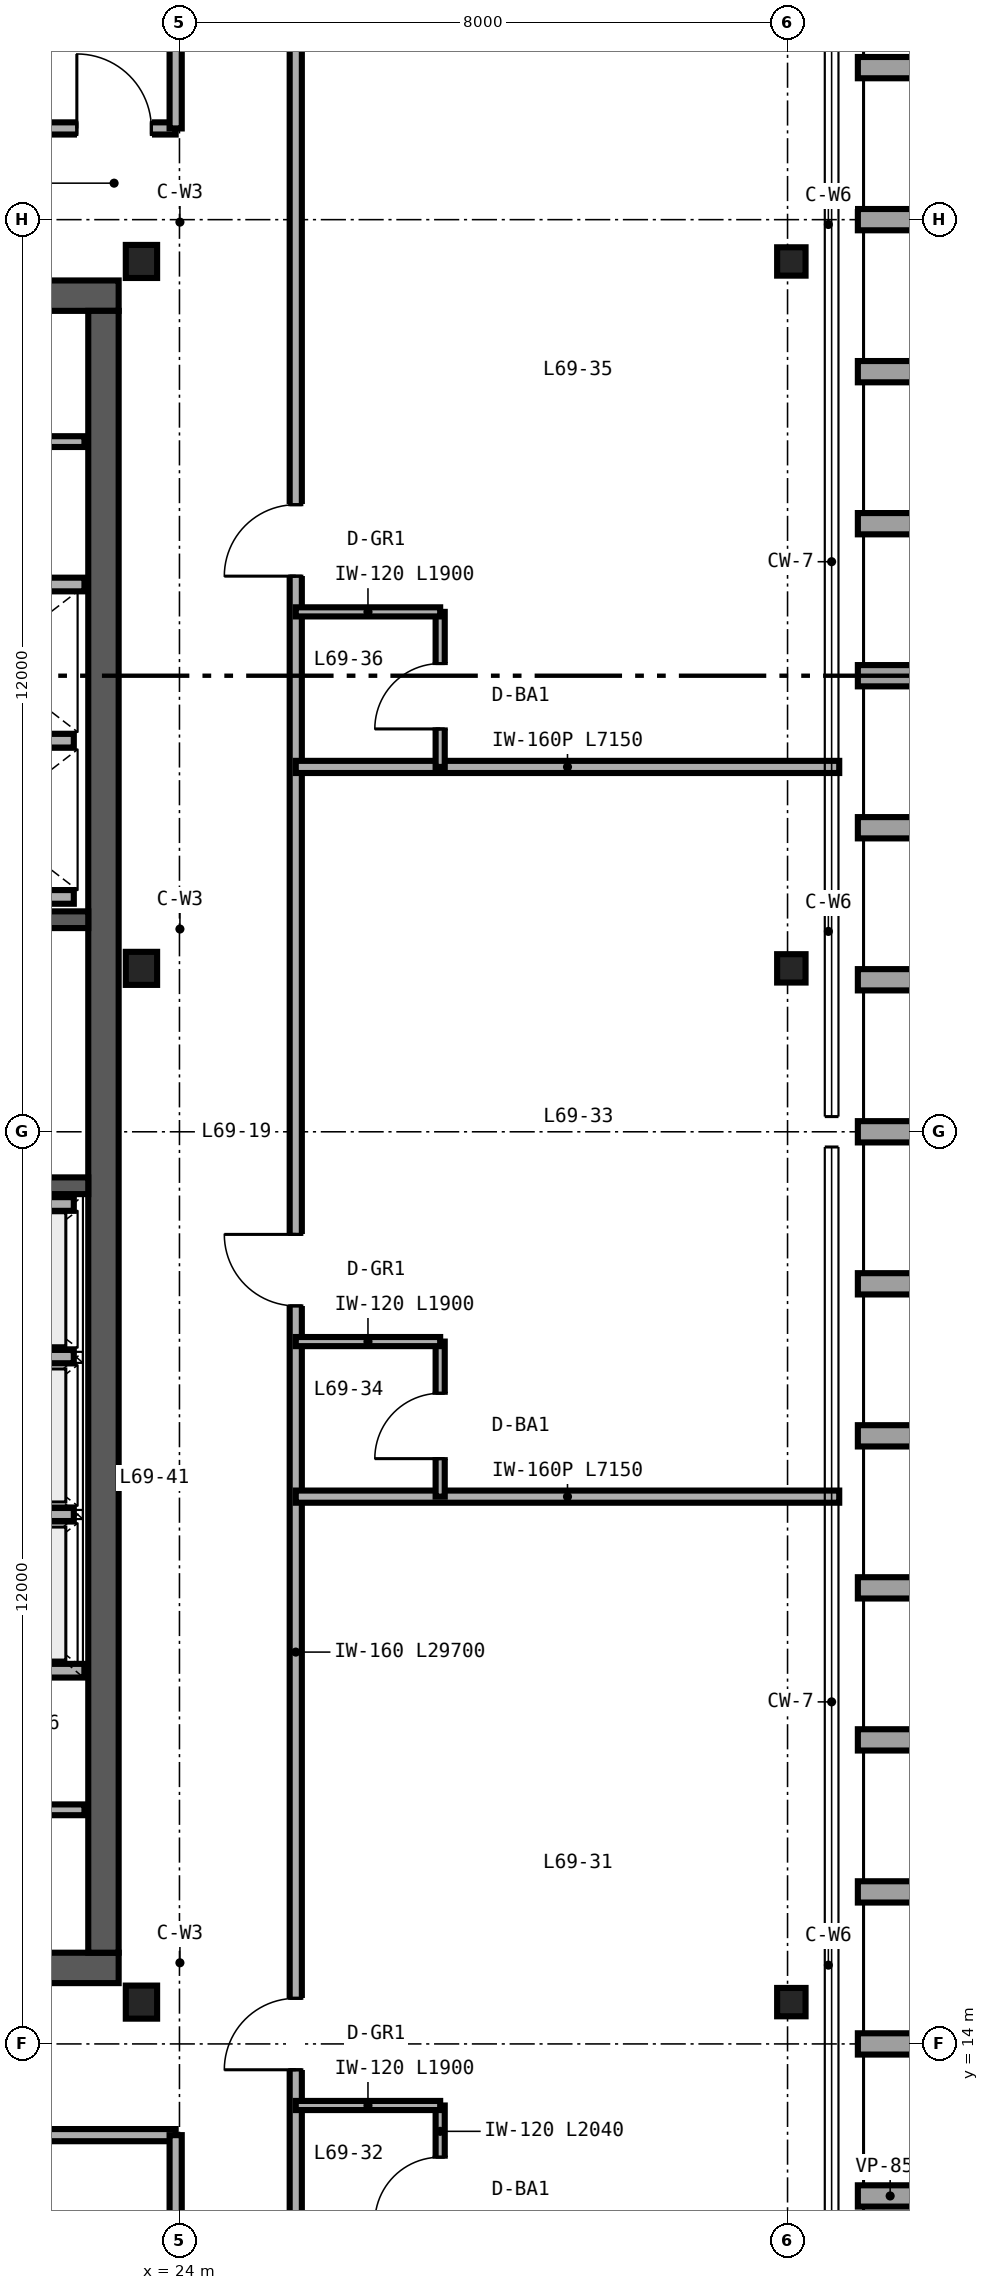
"""IFC4 building model, lengths in metres.
Left out: names, types, materials, properties, quantities, classifications, styles, units other than length and angle.
Written with IfcOpenShell. Run it as: python <this file> out.ifc"""

import sys

from ifc_helpers import new_model, si_unit, direction, frame, frame_2d, origin, origin_2d, place, context, subcontext, project, spatial, rectangle, i_section, extrude, source, transform, mapped, element, fill, save


model = new_model("IFC4")
c1 = context("Model", 3, precision=1e-05, world=origin(), true_north=direction((0.0, 1.0)))
c2 = subcontext(c1, "Body", "Model", "MODEL_VIEW")
j1 = project(units=[si_unit("LENGTHUNIT", "METRE"), si_unit("PLANEANGLEUNIT", "RADIAN")], contexts=[c1])
p1 = place(None, origin())
s1 = spatial("IfcSite", under=j1, at=p1, CompositionType="ELEMENT")
p2 = place(p1, origin())
s2 = spatial("IfcBuilding", under=s1, at=p2, CompositionType="ELEMENT")
p3 = place(p2, frame((0.0, 0.0, 272.4)))
s3 = spatial("IfcBuildingStorey", under=s2, at=p3, CompositionType="ELEMENT", Elevation=272.4)
p4 = place(p3, frame((10.8, 15.0, 0.0), z_axis=(0.0, 0.0, 1.0), x_axis=(1.0, 0.0, 0.0)))
e1 = element("IfcWall", 1, at=p4, inside=s3, PredefinedType="SHEAR", context=c2, shape_type="SweptSolid", body=[
    extrude(rectangle(XDim=12.4, YDim=0.4, at=frame_2d((6.2, 0.0))), origin(), (0.0, 0.0, 1.0), 3.38),
])
p5 = place(p4, frame((10.1, 0.0, 0.0)))
e2 = element("IfcOpeningElement", 2, at=p5, cuts=e1, PredefinedType="OPENING", context=c2, shape_type="SweptSolid", body=[
    extrude(rectangle(XDim=1.0, YDim=2.15, at=frame_2d((0.5, 1.075))), frame((0.0, 0.21, 0.0), z_axis=(0.0, -1.0, 0.0), x_axis=(1.0, 0.0, 0.0)), (0.0, 0.0, 1.0), 0.42),
])
p6 = place(p3, frame((10.8, 37.0, 0.0), z_axis=(0.0, 0.0, 1.0), x_axis=(1.0, 0.0, 0.0)))
e3 = element("IfcWall", 3, at=p6, inside=s3, PredefinedType="SHEAR", context=c2, shape_type="SweptSolid", body=[
    extrude(rectangle(XDim=12.4, YDim=0.4, at=frame_2d((6.2, 0.0))), origin(), (0.0, 0.0, 1.0), 3.38),
])
p7 = place(p6, frame((10.3, 0.0, 0.0)))
e4 = element("IfcOpeningElement", 4, at=p7, cuts=e3, PredefinedType="OPENING", context=c2, shape_type="SweptSolid", body=[
    extrude(rectangle(XDim=1.0, YDim=2.15, at=frame_2d((0.5, 1.075))), frame((0.0, 0.21, 0.0), z_axis=(0.0, -1.0, 0.0), x_axis=(1.0, 0.0, 0.0)), (0.0, 0.0, 1.0), 0.42),
])
p8 = place(p3, frame((23.0, 15.2, 0.0), z_axis=(0.0, 0.0, 1.0), x_axis=(0.0, 1.0, 0.0)))
e5 = element("IfcWall", 5, at=p8, inside=s3, PredefinedType="SHEAR", context=c2, shape_type="SweptSolid", body=[
    extrude(rectangle(XDim=21.6, YDim=0.4, at=frame_2d((10.8, 0.0))), origin(), (0.0, 0.0, 1.0), 3.38),
])
p9 = place(p3, frame((14.18, 25.29, 0.0), z_axis=(0.0, 0.0, 1.0), x_axis=(1.0, 0.0, 0.0)))
e6 = element("IfcWall", 6, at=p9, inside=s3, PredefinedType="SHEAR", context=c2, shape_type="SweptSolid", body=[
    extrude(rectangle(XDim=8.62, YDim=0.22, at=frame_2d((4.31, 0.0))), origin(), (0.0, 0.0, 1.0), 3.4),
])
p10 = place(p9, frame((0.47, 0.0, 0.0)))
e7 = element("IfcOpeningElement", 7, at=p10, cuts=e6, PredefinedType="OPENING", context=c2, shape_type="SweptSolid", body=[
    extrude(rectangle(XDim=1.05, YDim=2.15, at=frame_2d((0.525, 1.075))), frame((0.0, 0.12, 0.0), z_axis=(0.0, -1.0, 0.0), x_axis=(1.0, 0.0, 0.0)), (0.0, 0.0, 1.0), 0.24),
])
p11 = place(p3, frame((14.18, 28.79, 0.0), z_axis=(0.0, 0.0, 1.0), x_axis=(1.0, 0.0, 0.0)))
e8 = element("IfcWall", 8, at=p11, inside=s3, PredefinedType="SHEAR", context=c2, shape_type="SweptSolid", body=[
    extrude(rectangle(XDim=8.62, YDim=0.22, at=frame_2d((4.31, 0.0))), origin(), (0.0, 0.0, 1.0), 3.4),
])
m1 = source(origin(), c2, "Body", "SweptSolid", [
    extrude(i_section(OverallWidth=0.412, OverallDepth=0.435, WebThickness=0.036, FlangeThickness=0.057, FilletRadius=0.025, at=origin_2d()), origin(), (0.0, 0.0, 1.0), 3.38),
])
for number, where, z_axis, x_axis in (
    (9, (23.5, 14.55, 0.0), (0.0, 0.0, 1.0), (1.0, 0.0, 0.0)),
    (10, (23.5, 28.15, 0.0), (0.0, 0.0, 1.0), (1.0, 0.0, 0.0)),
    (11, (23.5, 37.45, 0.0), (0.0, 0.0, 1.0), (1.0, 0.0, 0.0)),
):
    element("IfcColumn", number, at=place(p3, frame(where, z_axis=z_axis, x_axis=x_axis)), inside=s3, PredefinedType="COLUMN", context=c2, shape_type="MappedRepresentation", body=[
        mapped(m1, transform((0.0, 0.0, 0.0), scale=1.0)),
    ])
m2 = source(origin(), c2, "Body", "SweptSolid", [
    extrude(i_section(OverallWidth=0.374, OverallDepth=0.373, WebThickness=0.016, FlangeThickness=0.026, FilletRadius=0.025, at=origin_2d()), origin(), (0.0, 0.0, 1.0), 3.38),
])
for number, where, z_axis, x_axis in (
    (12, (32.05, 14.55, 0.0), (0.0, 0.0, 1.0), (1.0, 0.0, 0.0)),
    (13, (32.05, 28.15, 0.0), (0.0, 0.0, 1.0), (1.0, 0.0, 0.0)),
    (14, (32.05, 37.45, 0.0), (0.0, 0.0, 1.0), (1.0, 0.0, 0.0)),
):
    element("IfcColumn", number, at=place(p3, frame(where, z_axis=z_axis, x_axis=x_axis)), inside=s3, PredefinedType="COLUMN", context=c2, shape_type="MappedRepresentation", body=[
        mapped(m2, transform((0.0, 0.0, 0.0), scale=1.0)),
    ])
p12 = place(p3, frame((20.12, 18.91, 0.0), z_axis=(0.0, 0.0, 1.0), x_axis=(1.0, 0.0, 0.0)))
e15 = element("IfcWall", 15, at=p12, inside=s3, PredefinedType="SOLIDWALL", context=c2, shape_type="SweptSolid", body=[
    extrude(rectangle(XDim=2.63, YDim=0.18, at=frame_2d((1.315, 0.0))), origin(), (0.0, 0.0, 1.0), 3.38),
])
p13 = place(p3, frame((20.25, 25.05, 0.0), z_axis=(0.0, 0.0, 1.0), x_axis=(1.0, 0.0, 0.0)))
e16 = element("IfcWall", 16, at=p13, inside=s3, PredefinedType="SOLIDWALL", context=c2, shape_type="SweptSolid", body=[
    extrude(rectangle(XDim=2.36, YDim=0.18, at=frame_2d((1.18, 0.0))), origin(), (0.0, 0.0, 1.0), 3.38),
])
p14 = place(p3, frame((20.25, 20.965, 0.0), z_axis=(0.0, 0.0, 1.0), x_axis=(1.0, 0.0, 0.0)))
e17 = element("IfcWall", 17, at=p14, inside=s3, PredefinedType="SOLIDWALL", context=c2, shape_type="SweptSolid", body=[
    extrude(rectangle(XDim=2.36, YDim=0.18, at=frame_2d((1.18, 0.0))), origin(), (0.0, 0.0, 1.0), 2.48),
])
for number, where, z_axis, x_axis in (
    (18, (20.25, 23.045, 0.0), (0.0, 0.0, 1.0), (1.0, 0.0, 0.0)),
    (19, (20.25, 29.09, 0.0), (0.0, 0.0, 1.0), (1.0, 0.0, 0.0)),
):
    element("IfcWall", number, at=place(p3, frame(where, z_axis=z_axis, x_axis=x_axis)), inside=s3, PredefinedType="SOLIDWALL", context=c2, shape_type="SweptSolid", body=[
        extrude(rectangle(XDim=2.36, YDim=0.18, at=frame_2d((1.18, 0.0))), origin(), (0.0, 0.0, 1.0), 3.38),
    ])
p15 = place(p3, frame((20.25, 33.2, 0.0), z_axis=(0.0, 0.0, 1.0), x_axis=(1.0, 0.0, 0.0)))
e20 = element("IfcWall", 20, at=p15, inside=s3, PredefinedType="SOLIDWALL", context=c2, shape_type="SweptSolid", body=[
    extrude(rectangle(XDim=2.5, YDim=0.18, at=frame_2d((1.25, 0.0))), origin(), (0.0, 0.0, 1.0), 3.38),
])
p16 = place(p3, frame((20.25, 31.145, 0.0), z_axis=(0.0, 0.0, 1.0), x_axis=(1.0, 0.0, 0.0)))
e21 = element("IfcWall", 21, at=p16, inside=s3, PredefinedType="SOLIDWALL", context=c2, shape_type="SweptSolid", body=[
    extrude(rectangle(XDim=2.36, YDim=0.18, at=frame_2d((1.18, 0.0))), origin(), (0.0, 0.0, 1.0), 3.38),
])
p17 = place(p3, frame((20.12, 17.08, 0.0), z_axis=(0.0, 0.0, 1.0), x_axis=(1.0, 0.0, 0.0)))
e22 = element("IfcWall", 22, at=p17, inside=s3, PredefinedType="PARTITIONING", context=c2, shape_type="SweptSolid", body=[
    extrude(rectangle(XDim=2.63, YDim=0.142, at=frame_2d((1.315, 0.0))), origin(), (0.0, 0.0, 1.0), 3.38),
])
p18 = place(p17, frame((0.85, 0.0, 0.0)))
e23 = element("IfcOpeningElement", 23, at=p18, cuts=e22, PredefinedType="OPENING", context=c2, shape_type="SweptSolid", body=[
    extrude(rectangle(XDim=0.84, YDim=2.1, at=frame_2d((0.42, 1.05))), frame((0.0, 0.081, 0.0), z_axis=(0.0, -1.0, 0.0), x_axis=(1.0, 0.0, 0.0)), (0.0, 0.0, 1.0), 0.162),
])
p19 = place(p3, frame((20.12, 35.08, 0.0), z_axis=(0.0, 0.0, 1.0), x_axis=(1.0, 0.0, 0.0)))
e24 = element("IfcWall", 24, at=p19, inside=s3, PredefinedType="PARTITIONING", context=c2, shape_type="SweptSolid", body=[
    extrude(rectangle(XDim=2.63, YDim=0.142, at=frame_2d((1.315, 0.0))), origin(), (0.0, 0.0, 1.0), 3.38),
])
p20 = place(p19, frame((0.85, 0.0, 0.0)))
e25 = element("IfcOpeningElement", 25, at=p20, cuts=e24, PredefinedType="OPENING", context=c2, shape_type="SweptSolid", body=[
    extrude(rectangle(XDim=0.84, YDim=2.1, at=frame_2d((0.42, 1.05))), frame((0.0, 0.081, 0.0), z_axis=(0.0, -1.0, 0.0), x_axis=(1.0, 0.0, 0.0)), (0.0, 0.0, 1.0), 0.162),
])
p21 = place(p3, frame((11.2, 12.8, 0.0), z_axis=(0.0, 0.0, 1.0), x_axis=(1.0, 0.0, 0.0)))
e26 = element("IfcWall", 26, at=p21, inside=s3, PredefinedType="PARTITIONING", context=c2, shape_type="SweptSolid", body=[
    extrude(rectangle(XDim=12.75, YDim=0.16, at=frame_2d((6.375, 0.0))), origin(), (0.0, 0.0, 1.0), 3.38),
])
p22 = place(p21, frame((5.7, 0.0, 0.0)))
e27 = element("IfcOpeningElement", 27, at=p22, cuts=e26, PredefinedType="OPENING", context=c2, shape_type="SweptSolid", body=[
    extrude(rectangle(XDim=0.98, YDim=2.2, at=frame_2d((0.49, 1.1))), frame((0.0, 0.09, 0.0), z_axis=(0.0, -1.0, 0.0), x_axis=(1.0, 0.0, 0.0)), (0.0, 0.0, 1.0), 0.18),
])
p23 = place(p21, frame((9.395, 0.0, 0.0)))
e28 = element("IfcOpeningElement", 28, at=p23, cuts=e26, PredefinedType="OPENING", context=c2, shape_type="SweptSolid", body=[
    extrude(rectangle(XDim=0.96, YDim=2.15, at=frame_2d((0.48, 1.075))), frame((0.0, 0.09, 0.0), z_axis=(0.0, -1.0, 0.0), x_axis=(1.0, 0.0, 0.0)), (0.0, 0.0, 1.0), 0.18),
])
p24 = place(p3, frame((23.95, 8.36, 0.0), z_axis=(0.0, 0.0, 1.0), x_axis=(0.0, 1.0, 0.0)))
e29 = element("IfcWall", 29, at=p24, inside=s3, PredefinedType="PARTITIONING", context=c2, shape_type="SweptSolid", body=[
    extrude(rectangle(XDim=4.44, YDim=0.16, at=frame_2d((2.22, 0.0))), origin(), (0.0, 0.0, 1.0), 3.38),
])
p25 = place(p3, frame((11.2, 39.2, 0.0), z_axis=(0.0, 0.0, 1.0), x_axis=(1.0, 0.0, 0.0)))
e30 = element("IfcWall", 30, at=p25, inside=s3, PredefinedType="PARTITIONING", context=c2, shape_type="SweptSolid", body=[
    extrude(rectangle(XDim=12.75, YDim=0.16, at=frame_2d((6.375, 0.0))), origin(), (0.0, 0.0, 1.0), 3.38),
])
p26 = place(p25, frame((11.45, 0.0, 0.0)))
e31 = element("IfcOpeningElement", 31, at=p26, cuts=e30, PredefinedType="OPENING", context=c2, shape_type="SweptSolid", body=[
    extrude(rectangle(XDim=0.98, YDim=2.2, at=frame_2d((0.49, 1.1))), frame((0.0, 0.09, 0.0), z_axis=(0.0, -1.0, 0.0), x_axis=(1.0, 0.0, 0.0)), (0.0, 0.0, 1.0), 0.18),
])
p27 = place(p3, frame((23.95, 39.2, 0.0), z_axis=(0.0, 0.0, 1.0), x_axis=(0.0, 1.0, 0.0)))
e32 = element("IfcWall", 32, at=p27, inside=s3, PredefinedType="PARTITIONING", context=c2, shape_type="SweptSolid", body=[
    extrude(rectangle(XDim=4.44, YDim=0.16, at=frame_2d((2.22, 0.0))), origin(), (0.0, 0.0, 1.0), 3.38),
])
p28 = place(p3, frame((25.53, 11.15, 0.0), z_axis=(0.0, 0.0, 1.0), x_axis=(0.0, 1.0, 0.0)))
e33 = element("IfcWall", 33, at=p28, inside=s3, PredefinedType="PARTITIONING", context=c2, shape_type="SweptSolid", body=[
    extrude(rectangle(XDim=29.7, YDim=0.16, at=frame_2d((14.85, 0.0))), origin(), (0.0, 0.0, 1.0), 2.524),
])
p29 = place(p28, frame((2.51, 0.0, 0.0)))
e34 = element("IfcOpeningElement", 34, at=p29, cuts=e33, PredefinedType="OPENING", context=c2, shape_type="SweptSolid", body=[
    extrude(rectangle(XDim=0.94, YDim=2.15, at=frame_2d((0.47, 1.075))), frame((0.0, 0.09, 0.0), z_axis=(0.0, -1.0, 0.0), x_axis=(1.0, 0.0, 0.0)), (0.0, 0.0, 1.0), 0.18),
])
p30 = place(p28, frame((12.56, 0.0, 0.0)))
e35 = element("IfcOpeningElement", 35, at=p30, cuts=e33, PredefinedType="OPENING", context=c2, shape_type="SweptSolid", body=[
    extrude(rectangle(XDim=0.94, YDim=2.15, at=frame_2d((0.47, 1.075))), frame((0.0, 0.09, 0.0), z_axis=(0.0, -1.0, 0.0), x_axis=(1.0, 0.0, 0.0)), (0.0, 0.0, 1.0), 0.18),
])
p31 = place(p28, frame((22.16, 0.0, 0.0)))
e36 = element("IfcOpeningElement", 36, at=p31, cuts=e33, PredefinedType="OPENING", context=c2, shape_type="SweptSolid", body=[
    extrude(rectangle(XDim=0.94, YDim=2.15, at=frame_2d((0.47, 1.075))), frame((0.0, 0.09, 0.0), z_axis=(0.0, -1.0, 0.0), x_axis=(1.0, 0.0, 0.0)), (0.0, 0.0, 1.0), 0.18),
])
p32 = place(p3, frame((25.53, 21.2, 0.0), z_axis=(0.0, 0.0, 1.0), x_axis=(1.0, 0.0, 0.0)))
e37 = element("IfcWall", 37, at=p32, inside=s3, PredefinedType="PARTITIONING", context=c2, shape_type="SweptSolid", body=[
    extrude(rectangle(XDim=7.15, YDim=0.16, at=frame_2d((3.575, 0.0))), origin(), (0.0, 0.0, 1.0), 2.601),
])
p33 = place(p3, frame((27.43, 11.15, 0.0), z_axis=(0.0, 0.0, 1.0), x_axis=(0.0, 1.0, 0.0)))
e38 = element("IfcWall", 38, at=p33, inside=s3, PredefinedType="PARTITIONING", context=c2, shape_type="SweptSolid", body=[
    extrude(rectangle(XDim=2.04, YDim=0.12, at=frame_2d((1.02, 0.0))), origin(), (0.0, 0.0, 1.0), 3.38),
])
p34 = place(p33, frame((0.5, 0.0, 0.0)))
e39 = element("IfcOpeningElement", 39, at=p34, cuts=e38, PredefinedType="OPENING", context=c2, shape_type="SweptSolid", body=[
    extrude(rectangle(XDim=0.86, YDim=2.1, at=frame_2d((0.43, 1.05))), frame((0.0, 0.07, 0.0), z_axis=(0.0, -1.0, 0.0), x_axis=(1.0, 0.0, 0.0)), (0.0, 0.0, 1.0), 0.14),
])
p35 = place(p3, frame((25.53, 13.19, 0.0), z_axis=(0.0, 0.0, 1.0), x_axis=(1.0, 0.0, 0.0)))
e40 = element("IfcWall", 40, at=p35, inside=s3, PredefinedType="PARTITIONING", context=c2, shape_type="SweptSolid", body=[
    extrude(rectangle(XDim=1.9, YDim=0.12, at=frame_2d((0.95, 0.0))), origin(), (0.0, 0.0, 1.0), 3.38),
])
p36 = place(p3, frame((25.53, 30.8, 0.0), z_axis=(0.0, 0.0, 1.0), x_axis=(1.0, 0.0, 0.0)))
e41 = element("IfcWall", 41, at=p36, inside=s3, PredefinedType="PARTITIONING", context=c2, shape_type="SweptSolid", body=[
    extrude(rectangle(XDim=7.15, YDim=0.16, at=frame_2d((3.575, 0.0))), origin(), (0.0, 0.0, 1.0), 2.763),
])
p37 = place(p3, frame((27.43, 21.2, 0.0), z_axis=(0.0, 0.0, 1.0), x_axis=(0.0, 1.0, 0.0)))
e42 = element("IfcWall", 42, at=p37, inside=s3, PredefinedType="PARTITIONING", context=c2, shape_type="SweptSolid", body=[
    extrude(rectangle(XDim=2.04, YDim=0.12, at=frame_2d((1.02, 0.0))), origin(), (0.0, 0.0, 1.0), 3.38),
])
p38 = place(p37, frame((0.5, 0.0, 0.0)))
e43 = element("IfcOpeningElement", 43, at=p38, cuts=e42, PredefinedType="OPENING", context=c2, shape_type="SweptSolid", body=[
    extrude(rectangle(XDim=0.86, YDim=2.1, at=frame_2d((0.43, 1.05))), frame((0.0, 0.07, 0.0), z_axis=(0.0, -1.0, 0.0), x_axis=(1.0, 0.0, 0.0)), (0.0, 0.0, 1.0), 0.14),
])
p39 = place(p3, frame((25.53, 23.24, 0.0), z_axis=(0.0, 0.0, 1.0), x_axis=(1.0, 0.0, 0.0)))
e44 = element("IfcWall", 44, at=p39, inside=s3, PredefinedType="PARTITIONING", context=c2, shape_type="SweptSolid", body=[
    extrude(rectangle(XDim=1.9, YDim=0.12, at=frame_2d((0.95, 0.0))), origin(), (0.0, 0.0, 1.0), 3.38),
])
p40 = place(p3, frame((27.43, 30.8, 0.0), z_axis=(0.0, 0.0, 1.0), x_axis=(0.0, 1.0, 0.0)))
e45 = element("IfcWall", 45, at=p40, inside=s3, PredefinedType="PARTITIONING", context=c2, shape_type="SweptSolid", body=[
    extrude(rectangle(XDim=2.04, YDim=0.12, at=frame_2d((1.02, 0.0))), origin(), (0.0, 0.0, 1.0), 3.38),
])
p41 = place(p40, frame((0.5, 0.0, 0.0)))
e46 = element("IfcOpeningElement", 46, at=p41, cuts=e45, PredefinedType="OPENING", context=c2, shape_type="SweptSolid", body=[
    extrude(rectangle(XDim=0.86, YDim=2.1, at=frame_2d((0.43, 1.05))), frame((0.0, 0.07, 0.0), z_axis=(0.0, -1.0, 0.0), x_axis=(1.0, 0.0, 0.0)), (0.0, 0.0, 1.0), 0.14),
])
p42 = place(p3, frame((25.53, 32.84, 0.0), z_axis=(0.0, 0.0, 1.0), x_axis=(1.0, 0.0, 0.0)))
e47 = element("IfcWall", 47, at=p42, inside=s3, PredefinedType="PARTITIONING", context=c2, shape_type="SweptSolid", body=[
    extrude(rectangle(XDim=1.9, YDim=0.12, at=frame_2d((0.95, 0.0))), origin(), (0.0, 0.0, 1.0), 3.38),
])
m3 = source(origin(), c2, "Body", "SweptSolid", [
    extrude(rectangle(XDim=0.98, YDim=2.2, at=frame_2d((0.49, 1.1))), frame((0.0, 0.025, 0.0), z_axis=(0.0, -1.0, 0.0), x_axis=(1.0, 0.0, 0.0)), (0.0, 0.0, 1.0), 0.05),
])
p43 = place(p26, origin())
e48 = element("IfcDoor", 48, at=p43, inside=s3, OperationType="SINGLE_SWING_LEFT", PredefinedType="DOOR", context=c2, shape_type="MappedRepresentation", body=[
    mapped(m3, transform((0.0, 0.0, 0.0), scale=1.0)),
])
fill(e31, e48)
m4 = source(origin(), c2, "Body", "SweptSolid", [
    extrude(rectangle(XDim=0.86, YDim=2.1, at=frame_2d((0.43, 1.05))), frame((0.0, 0.025, 0.0), z_axis=(0.0, -1.0, 0.0), x_axis=(1.0, 0.0, 0.0)), (0.0, 0.0, 1.0), 0.05),
])
p44 = place(p34, origin())
e49 = element("IfcDoor", 49, at=p44, inside=s3, OperationType="SINGLE_SWING_LEFT", PredefinedType="DOOR", context=c2, shape_type="MappedRepresentation", body=[
    mapped(m4, transform((0.0, 0.0, 0.0), scale=1.0)),
])
fill(e39, e49)
m5 = source(origin(), c2, "Body", "SweptSolid", [
    extrude(rectangle(XDim=0.94, YDim=2.15, at=frame_2d((0.47, 1.075))), frame((0.0, 0.025, 0.0), z_axis=(0.0, -1.0, 0.0), x_axis=(1.0, 0.0, 0.0)), (0.0, 0.0, 1.0), 0.05),
])
p45 = place(p29, origin())
e50 = element("IfcDoor", 50, at=p45, inside=s3, OperationType="SINGLE_SWING_LEFT", PredefinedType="DOOR", context=c2, shape_type="MappedRepresentation", body=[
    mapped(m5, transform((0.0, 0.0, 0.0), scale=1.0)),
])
fill(e34, e50)
p46 = place(p38, origin())
e51 = element("IfcDoor", 51, at=p46, inside=s3, OperationType="SINGLE_SWING_LEFT", PredefinedType="DOOR", context=c2, shape_type="MappedRepresentation", body=[
    mapped(m4, transform((0.0, 0.0, 0.0), scale=1.0)),
])
fill(e43, e51)
p47 = place(p30, origin())
e52 = element("IfcDoor", 52, at=p47, inside=s3, OperationType="SINGLE_SWING_RIGHT", PredefinedType="DOOR", context=c2, shape_type="MappedRepresentation", body=[
    mapped(m5, transform((0.0, 0.0, 0.0), scale=1.0)),
])
fill(e35, e52)
p48 = place(p41, origin())
e53 = element("IfcDoor", 53, at=p48, inside=s3, OperationType="SINGLE_SWING_LEFT", PredefinedType="DOOR", context=c2, shape_type="MappedRepresentation", body=[
    mapped(m4, transform((0.0, 0.0, 0.0), scale=1.0)),
])
fill(e46, e53)
p49 = place(p31, origin())
e54 = element("IfcDoor", 54, at=p49, inside=s3, OperationType="SINGLE_SWING_LEFT", PredefinedType="DOOR", context=c2, shape_type="MappedRepresentation", body=[
    mapped(m5, transform((0.0, 0.0, 0.0), scale=1.0)),
])
fill(e36, e54)
save(model, sys.argv[1])
